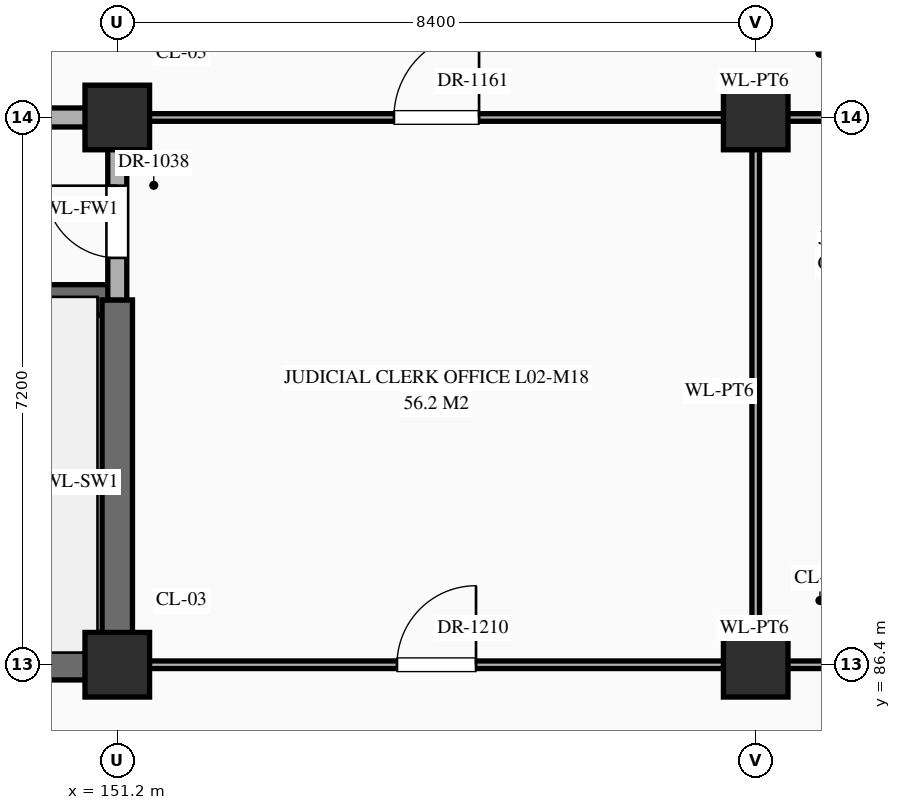
"""IFC4 building model, lengths in metres.
Left out: names, types, materials, properties, quantities, classifications, styles, units other than length and angle.
Written with IfcOpenShell. Run it as: python <this file> out.ifc"""

import sys

from ifc_helpers import new_model, si_unit, direction, frame, frame_2d, origin, origin_2d, place, context, subcontext, project, spatial, rectangle, extrude, element, fill, save


model = new_model("IFC4")
c1 = context("Model", 3, precision=1e-05, world=origin(), true_north=direction((0.0, 1.0)))
c2 = subcontext(c1, "Body", "Model", "MODEL_VIEW")
j1 = project(units=[si_unit("LENGTHUNIT", "METRE"), si_unit("PLANEANGLEUNIT", "RADIAN")], contexts=[c1])
p1 = place(None, origin())
s1 = spatial("IfcSite", under=j1, at=p1, CompositionType="ELEMENT")
p2 = place(p1, origin())
s2 = spatial("IfcBuilding", under=s1, at=p2, CompositionType="ELEMENT")
p3 = place(p2, frame((0.0, 0.0, 5.4)))
s3 = spatial("IfcBuildingStorey", under=s2, at=p3, CompositionType="ELEMENT", Elevation=5.4)
for number, where, z_axis, x_axis in (
    (1, (151.2, 86.4, 0.0), (0.0, 0.0, 1.0), (1.0, 0.0, 0.0)),
    (2, (151.2, 93.6, 0.0), (0.0, 0.0, 1.0), (1.0, 0.0, 0.0)),
    (3, (159.6, 86.4, 0.0), (0.0, 0.0, 1.0), (1.0, 0.0, 0.0)),
    (4, (159.6, 93.6, 0.0), (0.0, 0.0, 1.0), (1.0, 0.0, 0.0)),
):
    element("IfcColumn", number, at=place(p3, frame(where, z_axis=z_axis, x_axis=x_axis)), inside=s3, PredefinedType="COLUMN", context=c2, shape_type="SweptSolid", body=[
        extrude(rectangle(XDim=0.85, YDim=0.85, at=origin_2d()), origin(), (0.0, 0.0, 1.0), 5.4),
    ])
p4 = place(p3, frame((142.8, 86.4, 0.0), z_axis=(0.0, 0.0, 1.0), x_axis=(1.0, 0.0, 0.0)))
e5 = element("IfcWall", 5, at=p4, inside=s3, PredefinedType="SHEAR", context=c2, shape_type="SweptSolid", body=[
    extrude(rectangle(XDim=8.4, YDim=0.4, at=frame_2d((4.2, 0.0))), origin(), (0.0, 0.0, 1.0), 5.12),
])
p5 = place(p3, frame((151.2, 86.4, 0.0), z_axis=(0.0, 0.0, 1.0), x_axis=(1.0, 0.0, 0.0)))
e6 = element("IfcWall", 6, at=p5, inside=s3, PredefinedType="STANDARD", context=c2, shape_type="SweptSolid", body=[
    extrude(rectangle(XDim=16.76, YDim=0.1, at=frame_2d((8.38, 0.0))), origin(), (0.0, 0.0, 1.0), 4.27),
])
p6 = place(p5, frame((3.68, 0.0, 0.0)))
e7 = element("IfcOpeningElement", 7, at=p6, cuts=e6, PredefinedType="OPENING", context=c2, shape_type="SweptSolid", body=[
    extrude(rectangle(XDim=1.04, YDim=2.2, at=frame_2d((0.52, 1.1))), frame((0.0, 0.062, 0.0), z_axis=(0.0, -1.0, 0.0), x_axis=(1.0, 0.0, 0.0)), (0.0, 0.0, 1.0), 0.124),
])
p7 = place(p5, frame((9.413, 0.0, 0.0)))
e8 = element("IfcOpeningElement", 8, at=p7, cuts=e6, PredefinedType="OPENING", context=c2, shape_type="SweptSolid", body=[
    extrude(rectangle(XDim=1.12, YDim=2.25, at=frame_2d((0.56, 1.125))), frame((0.0, 0.062, 0.0), z_axis=(0.0, -1.0, 0.0), x_axis=(1.0, 0.0, 0.0)), (0.0, 0.0, 1.0), 0.124),
])
p8 = place(p5, frame((12.0, 0.0, 0.0)))
e9 = element("IfcOpeningElement", 9, at=p8, cuts=e6, PredefinedType="OPENING", context=c2, shape_type="SweptSolid", body=[
    extrude(rectangle(XDim=1.2, YDim=2.35, at=frame_2d((0.6, 1.175))), frame((0.0, 0.062, 0.0), z_axis=(0.0, -1.0, 0.0), x_axis=(1.0, 0.0, 0.0)), (0.0, 0.0, 1.0), 0.124),
])
p9 = place(p5, frame((14.607, 0.0, 0.0)))
e10 = element("IfcOpeningElement", 10, at=p9, cuts=e6, PredefinedType="OPENING", context=c2, shape_type="SweptSolid", body=[
    extrude(rectangle(XDim=1.24, YDim=2.3, at=frame_2d((0.62, 1.15))), frame((0.0, 0.062, 0.0), z_axis=(0.0, -1.0, 0.0), x_axis=(1.0, 0.0, 0.0)), (0.0, 0.0, 1.0), 0.124),
])
p10 = place(p3, frame((142.8, 91.2, 0.0), z_axis=(0.0, 0.0, 1.0), x_axis=(1.0, 0.0, 0.0)))
e11 = element("IfcWall", 11, at=p10, inside=s3, PredefinedType="SHEAR", context=c2, shape_type="SweptSolid", body=[
    extrude(rectangle(XDim=8.4, YDim=0.4, at=frame_2d((4.2, 0.0))), origin(), (0.0, 0.0, 1.0), 5.12),
])
p11 = place(p10, frame((0.65, 0.0, 0.0)))
e12 = element("IfcOpeningElement", 12, at=p11, cuts=e11, PredefinedType="OPENING", context=c2, shape_type="SweptSolid", body=[
    extrude(rectangle(XDim=1.1, YDim=2.2, at=frame_2d((0.55, 1.1))), frame((0.0, 0.212, 0.0), z_axis=(0.0, -1.0, 0.0), x_axis=(1.0, 0.0, 0.0)), (0.0, 0.0, 1.0), 0.424),
])
p12 = place(p3, frame((142.8, 93.6, 0.0), z_axis=(0.0, 0.0, 1.0), x_axis=(1.0, 0.0, 0.0)))
e13 = element("IfcWall", 13, at=p12, inside=s3, PredefinedType="STANDARD", context=c2, shape_type="SweptSolid", body=[
    extrude(rectangle(XDim=8.4, YDim=0.25, at=frame_2d((4.2, 0.0))), origin(), (0.0, 0.0, 1.0), 4.27),
])
p13 = place(p12, frame((3.45, 0.0, 0.0)))
e14 = element("IfcOpeningElement", 14, at=p13, cuts=e13, PredefinedType="OPENING", context=c2, shape_type="SweptSolid", body=[
    extrude(rectangle(XDim=1.5, YDim=2.25, at=frame_2d((0.75, 1.125))), frame((0.0, 0.137, 0.0), z_axis=(0.0, -1.0, 0.0), x_axis=(1.0, 0.0, 0.0)), (0.0, 0.0, 1.0), 0.274),
])
p14 = place(p3, frame((151.2, 93.6, 0.0), z_axis=(0.0, 0.0, 1.0), x_axis=(1.0, 0.0, 0.0)))
e15 = element("IfcWall", 15, at=p14, inside=s3, PredefinedType="STANDARD", context=c2, shape_type="SweptSolid", body=[
    extrude(rectangle(XDim=16.76, YDim=0.1, at=frame_2d((8.38, 0.0))), origin(), (0.0, 0.0, 1.0), 4.27),
])
p15 = place(p14, frame((3.64, 0.0, 0.0)))
e16 = element("IfcOpeningElement", 16, at=p15, cuts=e15, PredefinedType="OPENING", context=c2, shape_type="SweptSolid", body=[
    extrude(rectangle(XDim=1.12, YDim=2.25, at=frame_2d((0.56, 1.125))), frame((0.0, 0.062, 0.0), z_axis=(0.0, -1.0, 0.0), x_axis=(1.0, 0.0, 0.0)), (0.0, 0.0, 1.0), 0.124),
])
p16 = place(p14, frame((9.393, 0.0, 0.0)))
e17 = element("IfcOpeningElement", 17, at=p16, cuts=e15, PredefinedType="OPENING", context=c2, shape_type="SweptSolid", body=[
    extrude(rectangle(XDim=1.16, YDim=2.3, at=frame_2d((0.58, 1.15))), frame((0.0, 0.062, 0.0), z_axis=(0.0, -1.0, 0.0), x_axis=(1.0, 0.0, 0.0)), (0.0, 0.0, 1.0), 0.124),
])
p17 = place(p14, frame((12.0, 0.0, 0.0)))
e18 = element("IfcOpeningElement", 18, at=p17, cuts=e15, PredefinedType="OPENING", context=c2, shape_type="SweptSolid", body=[
    extrude(rectangle(XDim=1.2, YDim=2.35, at=frame_2d((0.6, 1.175))), frame((0.0, 0.062, 0.0), z_axis=(0.0, -1.0, 0.0), x_axis=(1.0, 0.0, 0.0)), (0.0, 0.0, 1.0), 0.124),
])
p18 = place(p14, frame((14.607, 0.0, 0.0)))
e19 = element("IfcOpeningElement", 19, at=p18, cuts=e15, PredefinedType="OPENING", context=c2, shape_type="SweptSolid", body=[
    extrude(rectangle(XDim=1.24, YDim=2.3, at=frame_2d((0.62, 1.15))), frame((0.0, 0.062, 0.0), z_axis=(0.0, -1.0, 0.0), x_axis=(1.0, 0.0, 0.0)), (0.0, 0.0, 1.0), 0.124),
])
p19 = place(p3, frame((151.2, 86.4, 0.0), z_axis=(0.0, 0.0, 1.0), x_axis=(0.0, 1.0, 0.0)))
e20 = element("IfcWall", 20, at=p19, inside=s3, PredefinedType="SHEAR", context=c2, shape_type="SweptSolid", body=[
    extrude(rectangle(XDim=4.8, YDim=0.4, at=frame_2d((2.4, 0.0))), origin(), (0.0, 0.0, 1.0), 5.12),
])
p20 = place(p3, frame((151.2, 91.2, 0.0), z_axis=(0.0, 0.0, 1.0), x_axis=(0.0, 1.0, 0.0)))
e21 = element("IfcWall", 21, at=p20, inside=s3, PredefinedType="STANDARD", context=c2, shape_type="SweptSolid", body=[
    extrude(rectangle(XDim=2.4, YDim=0.25, at=frame_2d((1.2, 0.0))), origin(), (0.0, 0.0, 1.0), 4.37),
])
p21 = place(p20, frame((0.552, 0.0, 0.0)))
e22 = element("IfcOpeningElement", 22, at=p21, cuts=e21, PredefinedType="OPENING", context=c2, shape_type="SweptSolid", body=[
    extrude(rectangle(XDim=0.95, YDim=2.15, at=frame_2d((0.475, 1.075))), frame((0.0, 0.137, 0.0), z_axis=(0.0, -1.0, 0.0), x_axis=(1.0, 0.0, 0.0)), (0.0, 0.0, 1.0), 0.274),
])
p22 = place(p3, frame((159.6, 86.4, 0.0), z_axis=(0.0, 0.0, 1.0), x_axis=(0.0, 1.0, 0.0)))
e23 = element("IfcWall", 23, at=p22, inside=s3, PredefinedType="STANDARD", context=c2, shape_type="SweptSolid", body=[
    extrude(rectangle(XDim=7.2, YDim=0.1, at=frame_2d((3.6, 0.0))), origin(), (0.0, 0.0, 1.0), 4.37),
])
p23 = place(p21, origin())
e24 = element("IfcDoor", 24, at=p23, inside=s3, OperationType="SINGLE_SWING_RIGHT", PredefinedType="DOOR", context=c2, shape_type="SweptSolid", body=[
    extrude(rectangle(XDim=0.95, YDim=2.15, at=frame_2d((0.475, 1.075))), frame((0.0, 0.025, 0.0), z_axis=(0.0, -1.0, 0.0), x_axis=(1.0, 0.0, 0.0)), (0.0, 0.0, 1.0), 0.05),
])
fill(e22, e24)
p24 = place(p15, origin())
e25 = element("IfcDoor", 25, at=p24, inside=s3, OperationType="SINGLE_SWING_RIGHT", PredefinedType="DOOR", context=c2, shape_type="SweptSolid", body=[
    extrude(rectangle(XDim=1.12, YDim=2.25, at=frame_2d((0.56, 1.125))), frame((0.0, 0.025, 0.0), z_axis=(0.0, -1.0, 0.0), x_axis=(1.0, 0.0, 0.0)), (0.0, 0.0, 1.0), 0.05),
])
fill(e16, e25)
p25 = place(p6, origin())
e26 = element("IfcDoor", 26, at=p25, inside=s3, OperationType="SINGLE_SWING_RIGHT", PredefinedType="DOOR", context=c2, shape_type="SweptSolid", body=[
    extrude(rectangle(XDim=1.04, YDim=2.2, at=frame_2d((0.52, 1.1))), frame((0.0, 0.025, 0.0), z_axis=(0.0, -1.0, 0.0), x_axis=(1.0, 0.0, 0.0)), (0.0, 0.0, 1.0), 0.05),
])
fill(e7, e26)
save(model, sys.argv[1])
